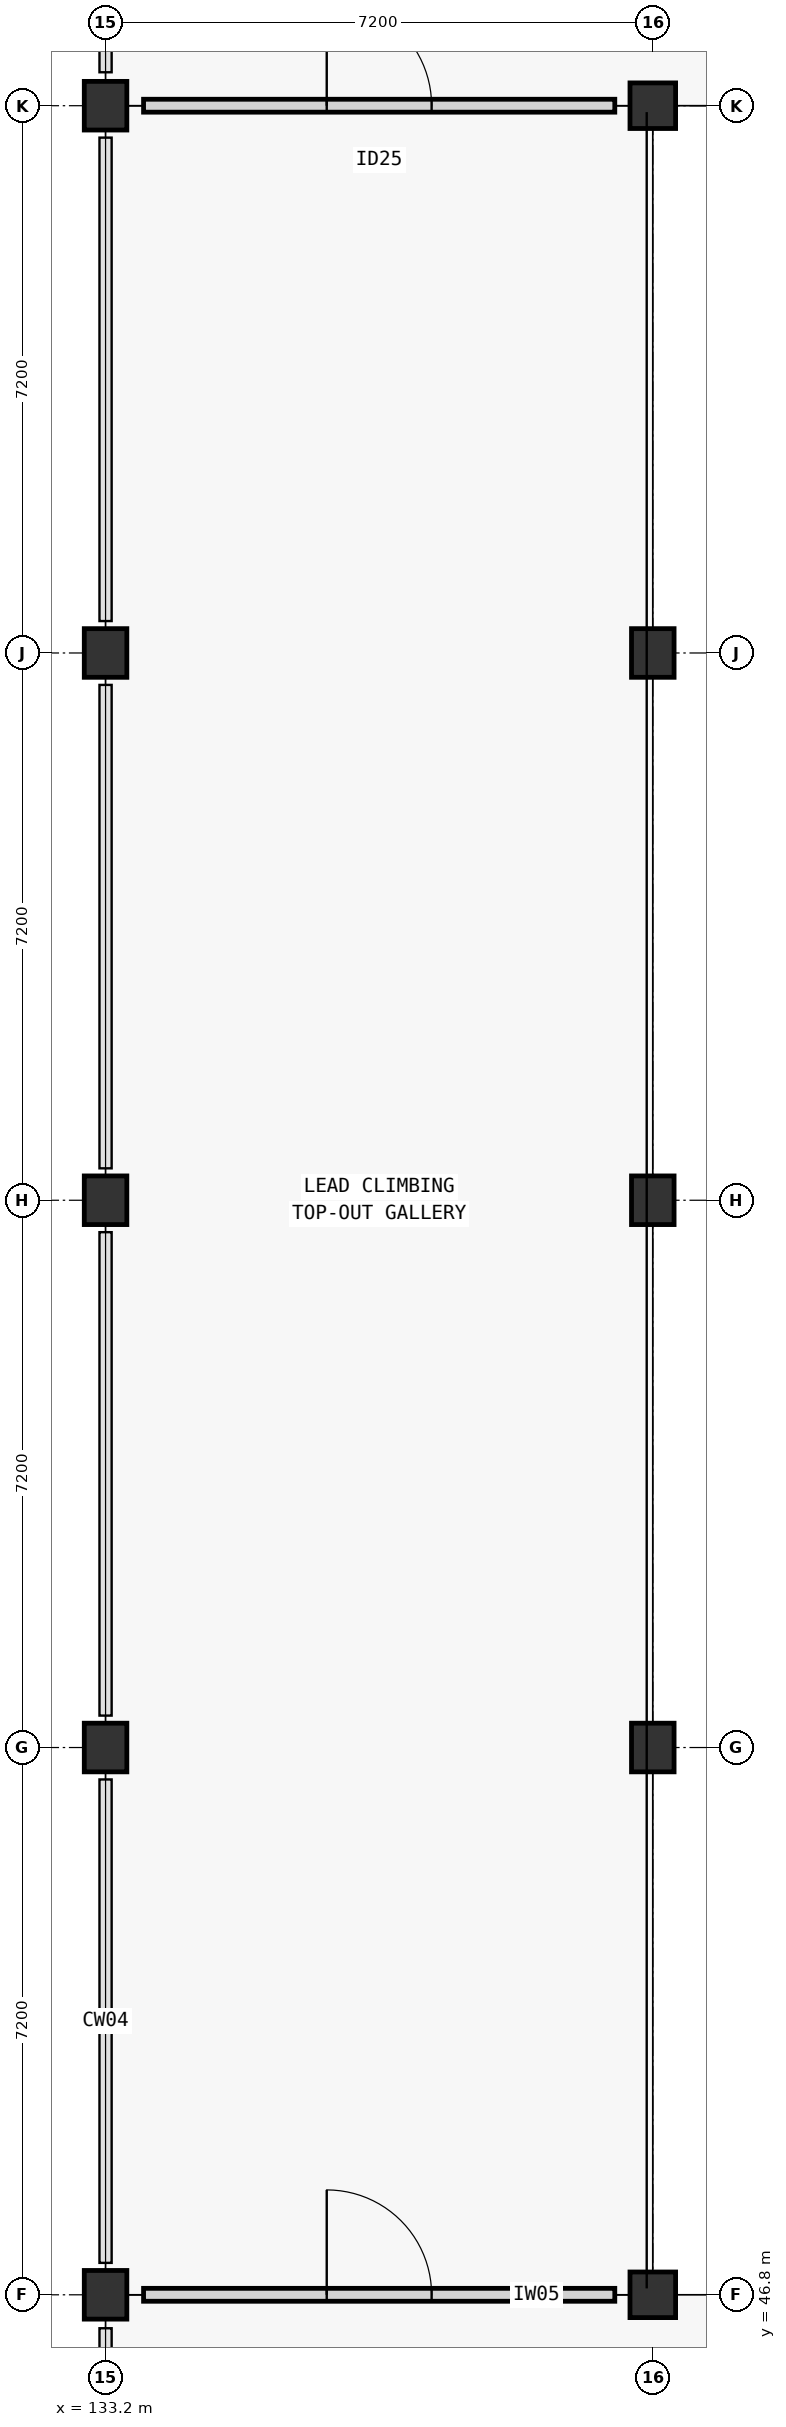
"""IFC4 building model, lengths in metres.
Left out: names, types, materials, properties, quantities, classifications, styles, units other than length and angle.
Written with IfcOpenShell. Run it as: python <this file> out.ifc"""

import sys

from ifc_helpers import new_model, si_unit, direction, frame, frame_2d, origin, origin_2d, place, context, subcontext, project, spatial, rectangle, extrude, element, fill, save


model = new_model("IFC4")
c1 = context("Model", 3, precision=1e-05, world=origin(), true_north=direction((0.0, 1.0)))
c2 = subcontext(c1, "Body", "Model", "MODEL_VIEW")
j1 = project(units=[si_unit("LENGTHUNIT", "METRE"), si_unit("PLANEANGLEUNIT", "RADIAN")], contexts=[c1])
p1 = place(None, origin())
s1 = spatial("IfcSite", under=j1, at=p1, CompositionType="ELEMENT")
p2 = place(p1, origin())
s2 = spatial("IfcBuilding", under=s1, at=p2, CompositionType="ELEMENT")
p3 = place(p2, frame((0.0, 0.0, 10.8)))
s3 = spatial("IfcBuildingStorey", under=s2, at=p3, CompositionType="ELEMENT", Elevation=10.8)
for number, where, z_axis, x_axis in (
    (1, (133.2, 46.8, 0.0), (0.0, 0.0, 1.0), (1.0, 0.0, 0.0)),
    (2, (133.2, 54.0, 0.0), (0.0, 0.0, 1.0), (1.0, 0.0, 0.0)),
    (3, (133.2, 61.2, 0.0), (0.0, 0.0, 1.0), (1.0, 0.0, 0.0)),
    (4, (133.2, 68.4, 0.0), (0.0, 0.0, 1.0), (1.0, 0.0, 0.0)),
    (5, (133.2, 75.6, 0.0), (0.0, 0.0, 1.0), (1.0, 0.0, 0.0)),
):
    element("IfcColumn", number, at=place(p3, frame(where, z_axis=z_axis, x_axis=x_axis)), inside=s3, PredefinedType="COLUMN", context=c2, shape_type="SweptSolid", body=[
        extrude(rectangle(XDim=0.56, YDim=0.64, at=origin_2d()), origin(), (0.0, 0.0, 1.0), 4.2),
    ])
p4 = place(p3, frame((140.4, 46.8, 0.0), z_axis=(0.0, 0.0, 1.0), x_axis=(1.0, 0.0, 0.0)))
e6 = element("IfcColumn", 6, at=p4, inside=s3, PredefinedType="COLUMN", context=c2, shape_type="SweptSolid", body=[
    extrude(rectangle(XDim=0.6, YDim=0.6, at=origin_2d()), origin(), (0.0, 0.0, 1.0), 4.2),
])
for number, where, z_axis, x_axis in (
    (7, (140.4, 54.0, 0.0), (0.0, 0.0, 1.0), (1.0, 0.0, 0.0)),
    (8, (140.4, 61.2, 0.0), (0.0, 0.0, 1.0), (1.0, 0.0, 0.0)),
    (9, (140.4, 68.4, 0.0), (0.0, 0.0, 1.0), (1.0, 0.0, 0.0)),
):
    element("IfcColumn", number, at=place(p3, frame(where, z_axis=z_axis, x_axis=x_axis)), inside=s3, PredefinedType="COLUMN", context=c2, shape_type="SweptSolid", body=[
        extrude(rectangle(XDim=0.56, YDim=0.64, at=origin_2d()), origin(), (0.0, 0.0, 1.0), 4.2),
    ])
p5 = place(p3, frame((140.4, 75.6, 0.0), z_axis=(0.0, 0.0, 1.0), x_axis=(1.0, 0.0, 0.0)))
e10 = element("IfcColumn", 10, at=p5, inside=s3, PredefinedType="COLUMN", context=c2, shape_type="SweptSolid", body=[
    extrude(rectangle(XDim=0.6, YDim=0.6, at=origin_2d()), origin(), (0.0, 0.0, 1.0), 4.2),
])
p6 = place(p3, frame((133.7, 75.6, 0.0), z_axis=(0.0, 0.0, 1.0), x_axis=(1.0, 0.0, 0.0)))
e11 = element("IfcWall", 11, at=p6, inside=s3, PredefinedType="STANDARD", context=c2, shape_type="SweptSolid", body=[
    extrude(rectangle(XDim=6.2, YDim=0.17, at=frame_2d((3.1, 0.0))), origin(), (0.0, 0.0, 1.0), 3.04),
])
p7 = place(p6, frame((2.41, 0.0, 0.0)))
e12 = element("IfcOpeningElement", 12, at=p7, cuts=e11, PredefinedType="OPENING", context=c2, shape_type="SweptSolid", body=[
    extrude(rectangle(XDim=1.38, YDim=2.2, at=frame_2d((0.69, 1.1))), frame((0.0, 0.085, 0.0), z_axis=(0.0, -1.0, 0.0), x_axis=(1.0, 0.0, 0.0)), (0.0, 0.0, 1.0), 0.17),
])
p8 = place(p3, frame((133.7, 46.8, 0.0), z_axis=(0.0, 0.0, 1.0), x_axis=(1.0, 0.0, 0.0)))
e13 = element("IfcWall", 13, at=p8, inside=s3, PredefinedType="STANDARD", context=c2, shape_type="SweptSolid", body=[
    extrude(rectangle(XDim=6.2, YDim=0.17, at=frame_2d((3.1, 0.0))), origin(), (0.0, 0.0, 1.0), 3.04),
])
p9 = place(p8, frame((2.41, 0.0, 0.0)))
e14 = element("IfcOpeningElement", 14, at=p9, cuts=e13, PredefinedType="OPENING", context=c2, shape_type="SweptSolid", body=[
    extrude(rectangle(XDim=1.38, YDim=2.2, at=frame_2d((0.69, 1.1))), frame((0.0, 0.085, 0.0), z_axis=(0.0, -1.0, 0.0), x_axis=(1.0, 0.0, 0.0)), (0.0, 0.0, 1.0), 0.17),
])
p10 = place(p7, origin())
e15 = element("IfcDoor", 15, at=p10, inside=s3, OperationType="SINGLE_SWING_LEFT", PredefinedType="DOOR", context=c2, shape_type="SweptSolid", body=[
    extrude(rectangle(XDim=1.38, YDim=2.2, at=frame_2d((0.69, 1.1))), frame((0.0, 0.025, 0.0), z_axis=(0.0, -1.0, 0.0), x_axis=(1.0, 0.0, 0.0)), (0.0, 0.0, 1.0), 0.05),
])
fill(e12, e15)
p11 = place(p9, origin())
e16 = element("IfcDoor", 16, at=p11, inside=s3, OperationType="SINGLE_SWING_LEFT", PredefinedType="DOOR", context=c2, shape_type="SweptSolid", body=[
    extrude(rectangle(XDim=1.38, YDim=2.2, at=frame_2d((0.69, 1.1))), frame((0.0, 0.025, 0.0), z_axis=(0.0, -1.0, 0.0), x_axis=(1.0, 0.0, 0.0)), (0.0, 0.0, 1.0), 0.05),
])
fill(e14, e16)
save(model, sys.argv[1])
